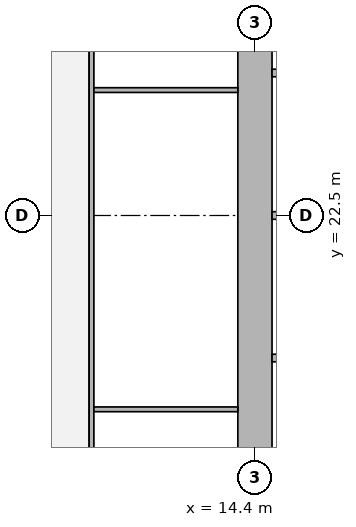
"""IFC4 building model, lengths in metres.
Left out: names, types, materials, properties, quantities, classifications, styles, units other than length and angle.
Written with IfcOpenShell. Run it as: python <this file> out.ifc"""

import sys

from ifc_helpers import new_model, si_unit, direction, frame, frame_2d, origin, place, context, subcontext, project, spatial, rectangle, extrude, element, fill, save


model = new_model("IFC4")
c1 = context("Model", 3, precision=1e-05, world=origin(), true_north=direction((0.0, 1.0)))
c2 = subcontext(c1, "Body", "Model", "MODEL_VIEW")
j1 = project(units=[si_unit("LENGTHUNIT", "METRE"), si_unit("PLANEANGLEUNIT", "RADIAN")], contexts=[c1])
p1 = place(None, origin())
s1 = spatial("IfcSite", under=j1, at=p1, CompositionType="ELEMENT")
p2 = place(p1, origin())
s2 = spatial("IfcBuilding", under=s1, at=p2, CompositionType="ELEMENT")
p3 = place(p2, frame((0.0, 0.0, 53.75)))
s3 = spatial("IfcBuildingStorey", under=s2, at=p3, CompositionType="ELEMENT", Elevation=53.75)
p4 = place(p3, frame((14.4, 15.45, 0.0), z_axis=(0.0, 0.0, 1.0), x_axis=(0.0, 1.0, 0.0)))
e1 = element("IfcWall", 1, at=p4, inside=s3, PredefinedType="SHEAR", context=c2, shape_type="SweptSolid", body=[
    extrude(rectangle(XDim=14.1, YDim=0.9, at=frame_2d((7.05, 0.0))), origin(), (0.0, 0.0, 1.0), 3.75),
])
p5 = place(p3, frame((10.1, 10.05, 0.0), z_axis=(0.0, 0.0, 1.0), x_axis=(0.0, 1.0, 0.0)))
e2 = element("IfcWall", 2, at=p5, inside=s3, PredefinedType="PARTITIONING", context=c2, shape_type="SweptSolid", body=[
    extrude(rectangle(XDim=24.9, YDim=0.125, at=frame_2d((12.45, 0.0))), origin(), (0.0, 0.0, 1.0), 3.5),
])
p6 = place(p5, frame((1.675, 0.0, 0.0)))
e3 = element("IfcOpeningElement", 3, at=p6, cuts=e2, PredefinedType="OPENING", context=c2, shape_type="SweptSolid", body=[
    extrude(rectangle(XDim=1.0, YDim=2.1, at=frame_2d((0.5, 1.05))), frame((0.0, 0.073, 0.0), z_axis=(0.0, -1.0, 0.0), x_axis=(1.0, 0.0, 0.0)), (0.0, 0.0, 1.0), 0.145),
])
p7 = place(p5, frame((5.35, 0.0, 0.0)))
e4 = element("IfcOpeningElement", 4, at=p7, cuts=e2, PredefinedType="OPENING", context=c2, shape_type="SweptSolid", body=[
    extrude(rectangle(XDim=1.0, YDim=2.1, at=frame_2d((0.5, 1.05))), frame((0.0, 0.073, 0.0), z_axis=(0.0, -1.0, 0.0), x_axis=(1.0, 0.0, 0.0)), (0.0, 0.0, 1.0), 0.145),
])
p8 = place(p5, frame((11.05, 0.0, 0.0)))
e5 = element("IfcOpeningElement", 5, at=p8, cuts=e2, PredefinedType="OPENING", context=c2, shape_type="SweptSolid", body=[
    extrude(rectangle(XDim=1.0, YDim=2.1, at=frame_2d((0.5, 1.05))), frame((0.0, 0.073, 0.0), z_axis=(0.0, -1.0, 0.0), x_axis=(1.0, 0.0, 0.0)), (0.0, 0.0, 1.0), 0.145),
])
p9 = place(p5, frame((18.35, 0.0, 0.0)))
e6 = element("IfcOpeningElement", 6, at=p9, cuts=e2, PredefinedType="OPENING", context=c2, shape_type="SweptSolid", body=[
    extrude(rectangle(XDim=1.0, YDim=2.1, at=frame_2d((0.5, 1.05))), frame((0.0, 0.073, 0.0), z_axis=(0.0, -1.0, 0.0), x_axis=(1.0, 0.0, 0.0)), (0.0, 0.0, 1.0), 0.145),
])
p10 = place(p5, frame((22.925, 0.0, 0.0)))
e7 = element("IfcOpeningElement", 7, at=p10, cuts=e2, PredefinedType="OPENING", context=c2, shape_type="SweptSolid", body=[
    extrude(rectangle(XDim=1.0, YDim=2.1, at=frame_2d((0.5, 1.05))), frame((0.0, 0.073, 0.0), z_axis=(0.0, -1.0, 0.0), x_axis=(1.0, 0.0, 0.0)), (0.0, 0.0, 1.0), 0.145),
])
for number, where, z_axis, x_axis in (
    (8, (10.163, 17.4, 0.0), (0.0, 0.0, 1.0), (1.0, 0.0, 0.0)),
    (9, (10.163, 25.8, 0.0), (0.0, 0.0, 1.0), (1.0, 0.0, 0.0)),
):
    element("IfcWall", number, at=place(p3, frame(where, z_axis=z_axis, x_axis=x_axis)), inside=s3, PredefinedType="PARTITIONING", context=c2, shape_type="SweptSolid", body=[
        extrude(rectangle(XDim=3.787, YDim=0.125, at=frame_2d((1.894, 0.0))), origin(), (0.0, 0.0, 1.0), 3.5),
    ])
for number, where, z_axis, x_axis in (
    (10, (14.85, 18.75, 0.0), (0.0, 0.0, 1.0), (1.0, 0.0, 0.0)),
    (11, (14.85, 22.5, 0.0), (0.0, 0.0, 1.0), (1.0, 0.0, 0.0)),
    (12, (14.85, 26.25, 0.0), (0.0, 0.0, 1.0), (1.0, 0.0, 0.0)),
):
    element("IfcWall", number, at=place(p3, frame(where, z_axis=z_axis, x_axis=x_axis)), inside=s3, PredefinedType="SOLIDWALL", context=c2, shape_type="SweptSolid", body=[
        extrude(rectangle(XDim=1.95, YDim=0.2, at=frame_2d((0.975, 0.0))), origin(), (0.0, 0.0, 1.0), 3.5),
    ])
p11 = place(p7, origin())
e13 = element("IfcDoor", 13, at=p11, inside=s3, OperationType="SINGLE_SWING_LEFT", PredefinedType="DOOR", context=c2, shape_type="SweptSolid", body=[
    extrude(rectangle(XDim=1.0, YDim=2.1, at=frame_2d((0.5, 1.05))), frame((0.0, 0.025, 0.0), z_axis=(0.0, -1.0, 0.0), x_axis=(1.0, 0.0, 0.0)), (0.0, 0.0, 1.0), 0.05),
])
fill(e4, e13)
p12 = place(p8, origin())
e14 = element("IfcDoor", 14, at=p12, inside=s3, OperationType="SINGLE_SWING_LEFT", PredefinedType="DOOR", context=c2, shape_type="SweptSolid", body=[
    extrude(rectangle(XDim=1.0, YDim=2.1, at=frame_2d((0.5, 1.05))), frame((0.0, 0.025, 0.0), z_axis=(0.0, -1.0, 0.0), x_axis=(1.0, 0.0, 0.0)), (0.0, 0.0, 1.0), 0.05),
])
fill(e5, e14)
save(model, sys.argv[1])
